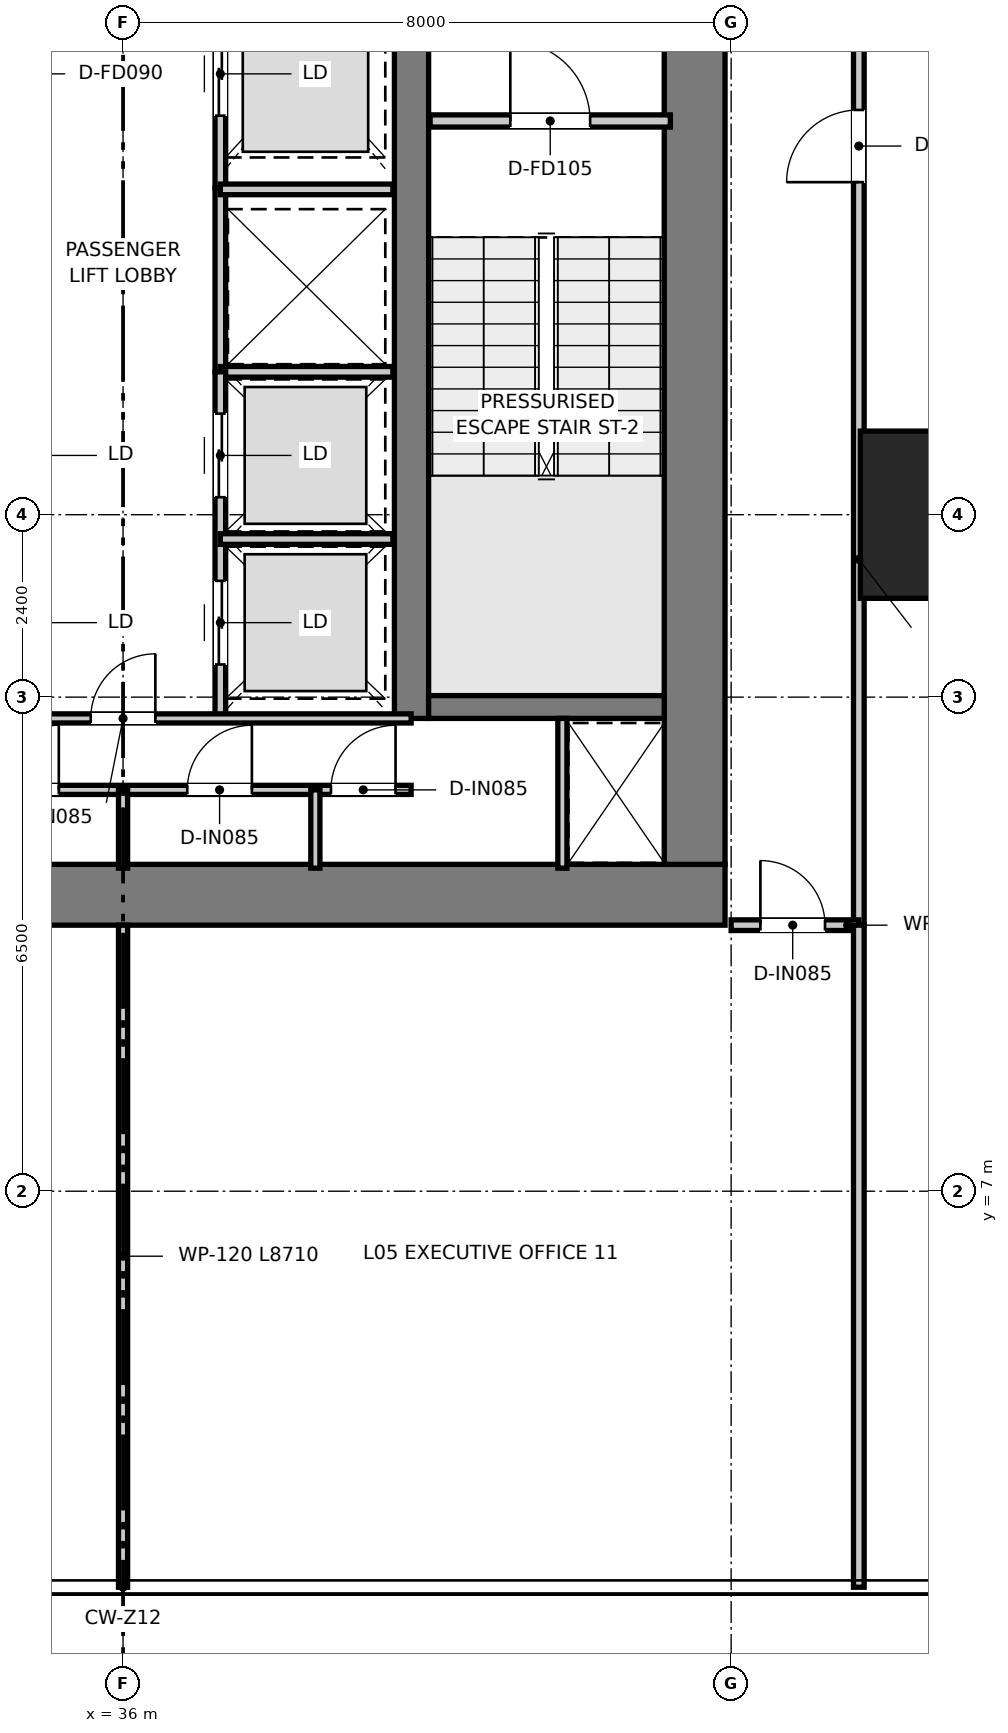
"""IFC4 building model, lengths in metres.
Left out: names, types, materials, properties, quantities, classifications, styles, units other than length and angle.
Written with IfcOpenShell. Run it as: python <this file> out.ifc"""

import sys

from ifc_helpers import new_model, si_unit, direction, frame, frame_2d, origin, origin_2d, place, context, subcontext, project, spatial, rectangle, extrude, source, transform, mapped, element, fill, save


model = new_model("IFC4")
c1 = context("Model", 3, precision=1e-05, world=origin(), true_north=direction((0.0, 1.0)))
c2 = subcontext(c1, "Body", "Model", "MODEL_VIEW")
j1 = project(units=[si_unit("LENGTHUNIT", "METRE"), si_unit("PLANEANGLEUNIT", "RADIAN")], contexts=[c1])
p1 = place(None, origin())
s1 = spatial("IfcSite", under=j1, at=p1, CompositionType="ELEMENT")
p2 = place(p1, origin())
s2 = spatial("IfcBuilding", under=s1, at=p2, CompositionType="ELEMENT")
p3 = place(p2, frame((0.0, 0.0, 25.0)))
s3 = spatial("IfcBuildingStorey", under=s2, at=p3, CompositionType="ELEMENT", Elevation=25.0)
p4 = place(p3, frame((28.08, 10.9, 0.0), z_axis=(0.0, 0.0, 1.0), x_axis=(1.0, 0.0, 0.0)))
e1 = element("IfcWall", 1, at=p4, inside=s3, PredefinedType="SHEAR", context=c2, shape_type="SweptSolid", body=[
    extrude(rectangle(XDim=15.84, YDim=0.8, at=frame_2d((7.92, 0.0))), origin(), (0.0, 0.0, 1.0), 3.95),
])
p5 = place(p3, frame((43.52, 11.3, 0.0), z_axis=(0.0, 0.0, 1.0), x_axis=(0.0, 1.0, 0.0)))
e2 = element("IfcWall", 2, at=p5, inside=s3, PredefinedType="SHEAR", context=c2, shape_type="SweptSolid", body=[
    extrude(rectangle(XDim=14.7, YDim=0.8, at=frame_2d((7.35, 0.0))), origin(), (0.0, 0.0, 1.0), 3.95),
])
p6 = place(p3, frame((39.795, 13.22, 0.0), z_axis=(0.0, 0.0, 1.0), x_axis=(0.0, 1.0, 0.0)))
e3 = element("IfcWall", 3, at=p6, inside=s3, PredefinedType="SHEAR", context=c2, shape_type="SweptSolid", body=[
    extrude(rectangle(XDim=12.78, YDim=0.45, at=frame_2d((6.39, 0.0))), origin(), (0.0, 0.0, 1.0), 3.95),
])
p7 = place(p6, frame((10.58, 0.0, 0.0)))
e4 = element("IfcOpeningElement", 4, at=p7, cuts=e3, PredefinedType="OPENING", context=c2, shape_type="SweptSolid", body=[
    extrude(rectangle(XDim=1.1, YDim=2.15, at=frame_2d((0.55, 1.075))), frame((0.0, 0.235, 0.0), z_axis=(0.0, -1.0, 0.0), x_axis=(1.0, 0.0, 0.0)), (0.0, 0.0, 1.0), 0.47),
])
p8 = place(p3, frame((40.02, 13.37, 0.0), z_axis=(0.0, 0.0, 1.0), x_axis=(1.0, 0.0, 0.0)))
e5 = element("IfcWall", 5, at=p8, inside=s3, PredefinedType="SHEAR", context=c2, shape_type="SweptSolid", body=[
    extrude(rectangle(XDim=3.1, YDim=0.3, at=frame_2d((1.55, 0.0))), origin(), (0.0, 0.0, 1.0), 3.95),
])
m1 = source(origin(), c2, "Body", "SweptSolid", [
    extrude(rectangle(XDim=2.2, YDim=2.2, at=origin_2d()), origin(), (0.0, 0.0, 1.0), 3.95),
])
p9 = place(p3, frame((46.8, 15.9, 0.0), z_axis=(0.0, 0.0, 1.0), x_axis=(1.0, 0.0, 0.0)))
e6 = element("IfcColumn", 6, at=p9, inside=s3, PredefinedType="USERDEFINED", context=c2, shape_type="MappedRepresentation", body=[
    mapped(m1, transform((0.0, 0.0, 0.0), x_axis=(1.0, 0.0, 0.0), y_axis=(0.0, 1.0, 0.0), z_axis=(0.0, 0.0, 1.0), scale=1.0)),
])
p10 = place(p3, frame((40.04, 21.08, 0.0), z_axis=(0.0, 0.0, 1.0), x_axis=(1.0, 0.0, 0.0)))
e7 = element("IfcWall", 7, at=p10, inside=s3, PredefinedType="PARTITIONING", context=c2, shape_type="SweptSolid", body=[
    extrude(rectangle(XDim=3.16, YDim=0.16, at=frame_2d((1.58, 0.0))), origin(), (0.0, 0.0, 1.0), 3.67),
])
p11 = place(p10, frame((1.055, 0.0, 0.0)))
e8 = element("IfcOpeningElement", 8, at=p11, cuts=e7, PredefinedType="OPENING", context=c2, shape_type="SweptSolid", body=[
    extrude(rectangle(XDim=1.05, YDim=2.1, at=frame_2d((0.525, 1.05))), frame((0.0, 0.09, 0.0), z_axis=(0.0, -1.0, 0.0), x_axis=(1.0, 0.0, 0.0)), (0.0, 0.0, 1.0), 0.18),
])
p12 = place(p3, frame((37.28, 20.2, 0.0), z_axis=(0.0, 0.0, 1.0), x_axis=(0.0, 1.0, 0.0)))
e9 = element("IfcWall", 9, at=p12, inside=s3, PredefinedType="PARTITIONING", context=c2, shape_type="SweptSolid", body=[
    extrude(rectangle(XDim=5.78, YDim=0.14, at=frame_2d((2.89, 0.0))), origin(), (0.0, 0.0, 1.0), 2.47),
])
p13 = place(p12, frame((0.95, 0.0, 0.0)))
e10 = element("IfcOpeningElement", 10, at=p13, cuts=e9, PredefinedType="OPENING", context=c2, shape_type="SweptSolid", body=[
    extrude(rectangle(XDim=1.1, YDim=2.15, at=frame_2d((0.55, 1.075))), frame((0.0, 0.08, 0.0), z_axis=(0.0, -1.0, 0.0), x_axis=(1.0, 0.0, 0.0)), (0.0, 0.0, 1.0), 0.16),
])
p14 = place(p3, frame((37.28, 17.78, 0.0), z_axis=(0.0, 0.0, 1.0), x_axis=(0.0, 1.0, 0.0)))
e11 = element("IfcWall", 11, at=p14, inside=s3, PredefinedType="PARTITIONING", context=c2, shape_type="SweptSolid", body=[
    extrude(rectangle(XDim=2.42, YDim=0.14, at=frame_2d((1.21, 0.0))), origin(), (0.0, 0.0, 1.0), 3.67),
])
for number, where, z_axis, x_axis in (
    (12, (37.28, 17.78, 0.0), (0.0, 0.0, 1.0), (1.0, 0.0, 0.0)),
    (13, (37.28, 20.18, 0.0), (0.0, 0.0, 1.0), (1.0, 0.0, 0.0)),
):
    element("IfcWall", number, at=place(p3, frame(where, z_axis=z_axis, x_axis=x_axis)), inside=s3, PredefinedType="PARTITIONING", context=c2, shape_type="SweptSolid", body=[
        extrude(rectangle(XDim=2.27, YDim=0.14, at=frame_2d((1.135, 0.0))), origin(), (0.0, 0.0, 1.0), 3.67),
    ])
p15 = place(p3, frame((37.28, 13.22, 0.0), z_axis=(0.0, 0.0, 1.0), x_axis=(0.0, 1.0, 0.0)))
e14 = element("IfcWall", 14, at=p15, inside=s3, PredefinedType="PARTITIONING", context=c2, shape_type="SweptSolid", body=[
    extrude(rectangle(XDim=4.56, YDim=0.14, at=frame_2d((2.28, 0.0))), origin(), (0.0, 0.0, 1.0), 3.67),
])
p16 = place(p15, frame((0.71, 0.0, 0.0)))
e15 = element("IfcOpeningElement", 15, at=p16, cuts=e14, PredefinedType="OPENING", context=c2, shape_type="SweptSolid", body=[
    extrude(rectangle(XDim=1.1, YDim=2.15, at=frame_2d((0.55, 1.075))), frame((0.0, 0.08, 0.0), z_axis=(0.0, -1.0, 0.0), x_axis=(1.0, 0.0, 0.0)), (0.0, 0.0, 1.0), 0.16),
])
p17 = place(p15, frame((2.91, 0.0, 0.0)))
e16 = element("IfcOpeningElement", 16, at=p17, cuts=e14, PredefinedType="OPENING", context=c2, shape_type="SweptSolid", body=[
    extrude(rectangle(XDim=1.1, YDim=2.15, at=frame_2d((0.55, 1.075))), frame((0.0, 0.08, 0.0), z_axis=(0.0, -1.0, 0.0), x_axis=(1.0, 0.0, 0.0)), (0.0, 0.0, 1.0), 0.16),
])
p18 = place(p3, frame((37.28, 15.58, 0.0), z_axis=(0.0, 0.0, 1.0), x_axis=(1.0, 0.0, 0.0)))
e17 = element("IfcWall", 17, at=p18, inside=s3, PredefinedType="PARTITIONING", context=c2, shape_type="SweptSolid", body=[
    extrude(rectangle(XDim=2.27, YDim=0.14, at=frame_2d((1.135, 0.0))), origin(), (0.0, 0.0, 1.0), 3.67),
])
p19 = place(p3, frame((41.78, 11.25, 0.0), z_axis=(0.0, 0.0, 1.0), x_axis=(0.0, 1.0, 0.0)))
e18 = element("IfcWall", 18, at=p19, inside=s3, PredefinedType="PARTITIONING", context=c2, shape_type="SweptSolid", body=[
    extrude(rectangle(XDim=1.97, YDim=0.12, at=frame_2d((0.985, 0.0))), origin(), (0.0, 0.0, 1.0), 3.67),
])
p20 = place(p3, frame((32.21, 13.22, 0.0), z_axis=(0.0, 0.0, 1.0), x_axis=(1.0, 0.0, 0.0)))
e19 = element("IfcWall", 19, at=p20, inside=s3, PredefinedType="PARTITIONING", context=c2, shape_type="SweptSolid", body=[
    extrude(rectangle(XDim=7.58, YDim=0.12, at=frame_2d((3.79, 0.0))), origin(), (0.0, 0.0, 1.0), 3.67),
])
p21 = place(p20, frame((3.365, 0.0, 0.0)))
e20 = element("IfcOpeningElement", 20, at=p21, cuts=e19, PredefinedType="OPENING", context=c2, shape_type="SweptSolid", body=[
    extrude(rectangle(XDim=0.85, YDim=2.1, at=frame_2d((0.425, 1.05))), frame((0.0, 0.07, 0.0), z_axis=(0.0, -1.0, 0.0), x_axis=(1.0, 0.0, 0.0)), (0.0, 0.0, 1.0), 0.14),
])
p22 = place(p3, frame((32.21, 12.28, 0.0), z_axis=(0.0, 0.0, 1.0), x_axis=(1.0, 0.0, 0.0)))
e21 = element("IfcWall", 21, at=p22, inside=s3, PredefinedType="PARTITIONING", context=c2, shape_type="SweptSolid", body=[
    extrude(rectangle(XDim=7.58, YDim=0.12, at=frame_2d((3.79, 0.0))), origin(), (0.0, 0.0, 1.0), 3.67),
])
p23 = place(p22, frame((0.205, 0.0, 0.0)))
e22 = element("IfcOpeningElement", 22, at=p23, cuts=e21, PredefinedType="OPENING", context=c2, shape_type="SweptSolid", body=[
    extrude(rectangle(XDim=0.85, YDim=2.1, at=frame_2d((0.425, 1.05))), frame((0.0, 0.07, 0.0), z_axis=(0.0, -1.0, 0.0), x_axis=(1.0, 0.0, 0.0)), (0.0, 0.0, 1.0), 0.14),
])
p24 = place(p22, frame((2.095, 0.0, 0.0)))
e23 = element("IfcOpeningElement", 23, at=p24, cuts=e21, PredefinedType="OPENING", context=c2, shape_type="SweptSolid", body=[
    extrude(rectangle(XDim=0.85, YDim=2.1, at=frame_2d((0.425, 1.05))), frame((0.0, 0.07, 0.0), z_axis=(0.0, -1.0, 0.0), x_axis=(1.0, 0.0, 0.0)), (0.0, 0.0, 1.0), 0.14),
])
p25 = place(p22, frame((4.635, 0.0, 0.0)))
e24 = element("IfcOpeningElement", 24, at=p25, cuts=e21, PredefinedType="OPENING", context=c2, shape_type="SweptSolid", body=[
    extrude(rectangle(XDim=0.85, YDim=2.1, at=frame_2d((0.425, 1.05))), frame((0.0, 0.07, 0.0), z_axis=(0.0, -1.0, 0.0), x_axis=(1.0, 0.0, 0.0)), (0.0, 0.0, 1.0), 0.14),
])
p26 = place(p22, frame((6.525, 0.0, 0.0)))
e25 = element("IfcOpeningElement", 25, at=p26, cuts=e21, PredefinedType="OPENING", context=c2, shape_type="SweptSolid", body=[
    extrude(rectangle(XDim=0.85, YDim=2.1, at=frame_2d((0.425, 1.05))), frame((0.0, 0.07, 0.0), z_axis=(0.0, -1.0, 0.0), x_axis=(1.0, 0.0, 0.0)), (0.0, 0.0, 1.0), 0.14),
])
for number, where, z_axis, x_axis in (
    (26, (36.0, 11.25, 0.0), (0.0, 0.0, 1.0), (0.0, 1.0, 0.0)),
    (27, (38.53, 11.25, 0.0), (0.0, 0.0, 1.0), (0.0, 1.0, 0.0)),
):
    element("IfcWall", number, at=place(p3, frame(where, z_axis=z_axis, x_axis=x_axis)), inside=s3, PredefinedType="PARTITIONING", context=c2, shape_type="SweptSolid", body=[
        extrude(rectangle(XDim=1.03, YDim=0.12, at=frame_2d((0.515, 0.0))), origin(), (0.0, 0.0, 1.0), 3.67),
    ])
p27 = place(p3, frame((45.68, 10.5, 0.0), z_axis=(0.0, 0.0, 1.0), x_axis=(0.0, 1.0, 0.0)))
e28 = element("IfcWall", 28, at=p27, inside=s3, PredefinedType="PARTITIONING", context=c2, shape_type="SweptSolid", body=[
    extrude(rectangle(XDim=25.62, YDim=0.14, at=frame_2d((12.81, 0.0))), origin(), (0.0, 0.0, 1.0), 2.97),
])
p28 = place(p27, frame((9.775, 0.0, 0.0)))
e29 = element("IfcOpeningElement", 29, at=p28, cuts=e28, PredefinedType="OPENING", context=c2, shape_type="SweptSolid", body=[
    extrude(rectangle(XDim=0.95, YDim=2.1, at=frame_2d((0.475, 1.05))), frame((0.0, 0.08, 0.0), z_axis=(0.0, -1.0, 0.0), x_axis=(1.0, 0.0, 0.0)), (0.0, 0.0, 1.0), 0.16),
])
p29 = place(p27, frame((18.375, 0.0, 0.0)))
e30 = element("IfcOpeningElement", 30, at=p29, cuts=e28, PredefinedType="OPENING", context=c2, shape_type="SweptSolid", body=[
    extrude(rectangle(XDim=0.95, YDim=2.1, at=frame_2d((0.475, 1.05))), frame((0.0, 0.08, 0.0), z_axis=(0.0, -1.0, 0.0), x_axis=(1.0, 0.0, 0.0)), (0.0, 0.0, 1.0), 0.16),
])
p30 = place(p3, frame((44.0, 10.5, 0.0), z_axis=(0.0, 0.0, 1.0), x_axis=(1.0, 0.0, 0.0)))
e31 = element("IfcWall", 31, at=p30, inside=s3, PredefinedType="PARTITIONING", context=c2, shape_type="SweptSolid", body=[
    extrude(rectangle(XDim=1.68, YDim=0.14, at=frame_2d((0.84, 0.0))), origin(), (0.0, 0.0, 1.0), 3.67),
])
p31 = place(p30, frame((0.385, 0.0, 0.0)))
e32 = element("IfcOpeningElement", 32, at=p31, cuts=e31, PredefinedType="OPENING", context=c2, shape_type="SweptSolid", body=[
    extrude(rectangle(XDim=0.85, YDim=2.1, at=frame_2d((0.425, 1.05))), frame((0.0, 0.08, 0.0), z_axis=(0.0, -1.0, 0.0), x_axis=(1.0, 0.0, 0.0)), (0.0, 0.0, 1.0), 0.16),
])
p32 = place(p3, frame((45.68, 1.79, 0.0), z_axis=(0.0, 0.0, 1.0), x_axis=(0.0, 1.0, 0.0)))
e33 = element("IfcWall", 33, at=p32, inside=s3, PredefinedType="PARTITIONING", context=c2, shape_type="SweptSolid", body=[
    extrude(rectangle(XDim=8.71, YDim=0.14, at=frame_2d((4.355, 0.0))), origin(), (0.0, 0.0, 1.0), 3.67),
])
p33 = place(p3, frame((36.0, 1.79, 0.0), z_axis=(0.0, 0.0, 1.0), x_axis=(0.0, 1.0, 0.0)))
e34 = element("IfcWall", 34, at=p33, inside=s3, PredefinedType="PARTITIONING", context=c2, shape_type="SweptSolid", body=[
    extrude(rectangle(XDim=8.71, YDim=0.12, at=frame_2d((4.355, 0.0))), origin(), (0.0, 0.0, 1.0), 3.67),
])
p34 = place(p11, origin())
e35 = element("IfcDoor", 35, at=p34, inside=s3, OperationType="SINGLE_SWING_LEFT", PredefinedType="DOOR", context=c2, shape_type="SweptSolid", body=[
    extrude(rectangle(XDim=1.05, YDim=2.1, at=frame_2d((0.525, 1.05))), frame((0.0, 0.025, 0.0), z_axis=(0.0, -1.0, 0.0), x_axis=(1.0, 0.0, 0.0)), (0.0, 0.0, 1.0), 0.05),
])
fill(e8, e35)
p35 = place(p13, origin())
e36 = element("IfcDoor", 36, at=p35, inside=s3, OperationType="DOUBLE_DOOR_SLIDING", PredefinedType="DOOR", context=c2, shape_type="SweptSolid", body=[
    extrude(rectangle(XDim=1.1, YDim=2.15, at=frame_2d((0.55, 1.075))), frame((0.0, 0.025, 0.0), z_axis=(0.0, -1.0, 0.0), x_axis=(1.0, 0.0, 0.0)), (0.0, 0.0, 1.0), 0.05),
])
fill(e10, e36)
p36 = place(p16, origin())
e37 = element("IfcDoor", 37, at=p36, inside=s3, OperationType="DOUBLE_DOOR_SLIDING", PredefinedType="DOOR", context=c2, shape_type="SweptSolid", body=[
    extrude(rectangle(XDim=1.1, YDim=2.15, at=frame_2d((0.55, 1.075))), frame((0.0, 0.025, 0.0), z_axis=(0.0, -1.0, 0.0), x_axis=(1.0, 0.0, 0.0)), (0.0, 0.0, 1.0), 0.05),
])
fill(e15, e37)
p37 = place(p17, origin())
e38 = element("IfcDoor", 38, at=p37, inside=s3, OperationType="DOUBLE_DOOR_SLIDING", PredefinedType="DOOR", context=c2, shape_type="SweptSolid", body=[
    extrude(rectangle(XDim=1.1, YDim=2.15, at=frame_2d((0.55, 1.075))), frame((0.0, 0.025, 0.0), z_axis=(0.0, -1.0, 0.0), x_axis=(1.0, 0.0, 0.0)), (0.0, 0.0, 1.0), 0.05),
])
fill(e16, e38)
p38 = place(p21, origin())
e39 = element("IfcDoor", 39, at=p38, inside=s3, OperationType="SINGLE_SWING_RIGHT", PredefinedType="DOOR", context=c2, shape_type="SweptSolid", body=[
    extrude(rectangle(XDim=0.85, YDim=2.1, at=frame_2d((0.425, 1.05))), frame((0.0, 0.025, 0.0), z_axis=(0.0, -1.0, 0.0), x_axis=(1.0, 0.0, 0.0)), (0.0, 0.0, 1.0), 0.05),
])
fill(e20, e39)
p39 = place(p24, origin())
e40 = element("IfcDoor", 40, at=p39, inside=s3, OperationType="SINGLE_SWING_RIGHT", PredefinedType="DOOR", context=c2, shape_type="SweptSolid", body=[
    extrude(rectangle(XDim=0.85, YDim=2.1, at=frame_2d((0.425, 1.05))), frame((0.0, 0.025, 0.0), z_axis=(0.0, -1.0, 0.0), x_axis=(1.0, 0.0, 0.0)), (0.0, 0.0, 1.0), 0.05),
])
fill(e23, e40)
p40 = place(p25, origin())
e41 = element("IfcDoor", 41, at=p40, inside=s3, OperationType="SINGLE_SWING_RIGHT", PredefinedType="DOOR", context=c2, shape_type="SweptSolid", body=[
    extrude(rectangle(XDim=0.85, YDim=2.1, at=frame_2d((0.425, 1.05))), frame((0.0, 0.025, 0.0), z_axis=(0.0, -1.0, 0.0), x_axis=(1.0, 0.0, 0.0)), (0.0, 0.0, 1.0), 0.05),
])
fill(e24, e41)
p41 = place(p26, origin())
e42 = element("IfcDoor", 42, at=p41, inside=s3, OperationType="SINGLE_SWING_RIGHT", PredefinedType="DOOR", context=c2, shape_type="SweptSolid", body=[
    extrude(rectangle(XDim=0.85, YDim=2.1, at=frame_2d((0.425, 1.05))), frame((0.0, 0.025, 0.0), z_axis=(0.0, -1.0, 0.0), x_axis=(1.0, 0.0, 0.0)), (0.0, 0.0, 1.0), 0.05),
])
fill(e25, e42)
p42 = place(p28, origin())
e43 = element("IfcDoor", 43, at=p42, inside=s3, OperationType="SINGLE_SWING_LEFT", PredefinedType="DOOR", context=c2, shape_type="SweptSolid", body=[
    extrude(rectangle(XDim=0.95, YDim=2.1, at=frame_2d((0.475, 1.05))), frame((0.0, 0.025, 0.0), z_axis=(0.0, -1.0, 0.0), x_axis=(1.0, 0.0, 0.0)), (0.0, 0.0, 1.0), 0.05),
])
fill(e29, e43)
p43 = place(p31, origin())
e44 = element("IfcDoor", 44, at=p43, inside=s3, OperationType="SINGLE_SWING_LEFT", PredefinedType="DOOR", context=c2, shape_type="SweptSolid", body=[
    extrude(rectangle(XDim=0.85, YDim=2.1, at=frame_2d((0.425, 1.05))), frame((0.0, 0.025, 0.0), z_axis=(0.0, -1.0, 0.0), x_axis=(1.0, 0.0, 0.0)), (0.0, 0.0, 1.0), 0.05),
])
fill(e32, e44)
save(model, sys.argv[1])
